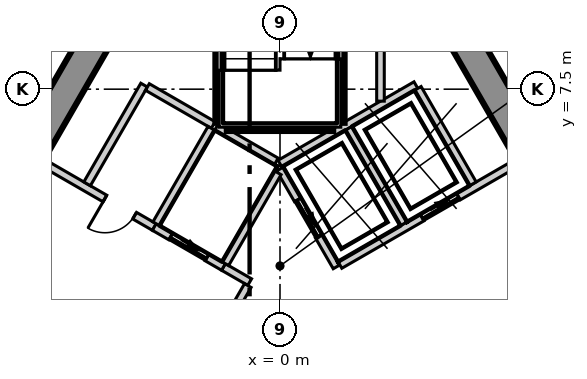
"""IFC4 building model, lengths in metres.
Left out: names, types, materials, properties, quantities, classifications, styles, units other than length and angle.
Written with IfcOpenShell. Run it as: python <this file> out.ifc"""

import sys

from ifc_helpers import new_model, si_unit, direction, frame, frame_2d, origin, place, context, subcontext, project, spatial, polyline, rectangle, outline, extrude, element, fill, save


model = new_model("IFC4")
c1 = context("Model", 3, precision=1e-05, world=origin(), true_north=direction((0.0, 1.0)))
c2 = subcontext(c1, "Body", "Model", "MODEL_VIEW")
j1 = project(units=[si_unit("LENGTHUNIT", "METRE"), si_unit("PLANEANGLEUNIT", "RADIAN")], contexts=[c1])
p1 = place(None, origin())
s1 = spatial("IfcSite", under=j1, at=p1, CompositionType="ELEMENT")
p2 = place(p1, origin())
s2 = spatial("IfcBuilding", under=s1, at=p2, CompositionType="ELEMENT")
p3 = place(p2, frame((0.0, 0.0, 152.3)))
s3 = spatial("IfcBuildingStorey", under=s2, at=p3, CompositionType="ELEMENT", Elevation=152.3)
p4 = place(p3, frame((-1.674, 14.3, -0.3), z_axis=(0.0, 0.0, 1.0), x_axis=(-0.499995765644, -0.866027848477, 0.0)))
e1 = element("IfcWall", 1, at=p4, inside=s3, PredefinedType="SHEAR", context=c2, shape_type="SweptSolid", body=[
    extrude(outline(polyline([(-0.231, -0.4), (1.732, -0.4), (3.695, -0.4), (5.658, -0.4), (7.621, -0.4), (9.584, -0.4), (11.547, -0.4), (13.51, -0.4), (15.473, -0.4), (17.436, -0.4), (19.399, -0.4), (21.362, -0.4), (23.325, -0.4), (22.863, 0.4), (20.977, 0.4), (19.091, 0.4), (17.205, 0.4), (15.319, 0.4), (13.433, 0.4), (11.547, 0.4), (9.661, 0.4), (7.775, 0.4), (5.889, 0.4), (4.003, 0.4), (2.117, 0.4), (0.231, 0.4), (-0.231, -0.4)])), origin(), (0.0, 0.0, 1.0), 4.0),
])
p5 = place(p4, frame((10.997, 0.0, 0.3)))
e2 = element("IfcOpeningElement", 2, at=p5, cuts=e1, PredefinedType="OPENING", context=c2, shape_type="SweptSolid", body=[
    extrude(rectangle(XDim=1.1, YDim=2.1, at=frame_2d((0.55, 1.05))), frame((0.0, 0.41, 0.0), z_axis=(0.0, -1.0, 0.0), x_axis=(1.0, 0.0, 0.0)), (0.0, 0.0, 1.0), 0.82),
])
p6 = place(p4, frame((4.474, 0.0, 0.3)))
e3 = element("IfcOpeningElement", 3, at=p6, cuts=e1, PredefinedType="OPENING", context=c2, shape_type="SweptSolid", body=[
    extrude(rectangle(XDim=0.9, YDim=2.1, at=frame_2d((0.45, 1.05))), frame((0.0, 0.41, 0.0), z_axis=(0.0, -1.0, 0.0), x_axis=(1.0, 0.0, 0.0)), (0.0, 0.0, 1.0), 0.82),
])
p7 = place(p3, frame((13.221, -5.7, -0.3), z_axis=(0.0, 0.0, 1.0), x_axis=(-0.499995765644, 0.866027848477, 0.0)))
e4 = element("IfcWall", 4, at=p7, inside=s3, PredefinedType="SHEAR", context=c2, shape_type="SweptSolid", body=[
    extrude(outline(polyline([(-0.231, -0.4), (1.732, -0.4), (3.695, -0.4), (5.658, -0.4), (7.621, -0.4), (9.584, -0.4), (11.547, -0.4), (13.51, -0.4), (15.473, -0.4), (17.436, -0.4), (19.399, -0.4), (21.362, -0.4), (23.325, -0.4), (22.863, 0.4), (20.977, 0.4), (19.091, 0.4), (17.205, 0.4), (15.319, 0.4), (13.433, 0.4), (11.547, 0.4), (9.661, 0.4), (7.775, 0.4), (5.889, 0.4), (4.003, 0.4), (2.117, 0.4), (0.231, 0.4), (-0.231, -0.4)])), origin(), (0.0, 0.0, 1.0), 4.0),
])
p8 = place(p7, frame((10.647, 0.0, 0.3)))
e5 = element("IfcOpeningElement", 5, at=p8, cuts=e4, PredefinedType="OPENING", context=c2, shape_type="SweptSolid", body=[
    extrude(rectangle(XDim=1.8, YDim=2.1, at=frame_2d((0.9, 1.05))), frame((0.0, 0.41, 0.0), z_axis=(0.0, -1.0, 0.0), x_axis=(1.0, 0.0, 0.0)), (0.0, 0.0, 1.0), 0.82),
])
p9 = place(p3, frame((-3.018, 33.666, 0.0), z_axis=(0.0, 0.0, 1.0), x_axis=(-0.499984613623, -0.866034286931, 0.0)))
e6 = element("IfcWall", 6, at=p9, inside=s3, PredefinedType="ELEMENTEDWALL", context=c2, shape_type="SweptSolid", body=[
    extrude(rectangle(XDim=55.274, YDim=0.2, at=frame_2d((27.637, 0.0))), origin(), (0.0, 0.0, 1.0), 3.7),
])
p10 = place(p9, frame((2.145, 0.0, 0.9)))
e7 = element("IfcOpeningElement", 7, at=p10, cuts=e6, PredefinedType="OPENING", context=c2, shape_type="SweptSolid", body=[
    extrude(rectangle(XDim=4.9, YDim=2.5, at=frame_2d((2.45, 1.25))), frame((0.0, 0.11, 0.0), z_axis=(0.0, -1.0, 0.0), x_axis=(1.0, 0.0, 0.0)), (0.0, 0.0, 1.0), 0.22),
])
p11 = place(p9, frame((8.731, 0.0, 0.9)))
e8 = element("IfcOpeningElement", 8, at=p11, cuts=e6, PredefinedType="OPENING", context=c2, shape_type="SweptSolid", body=[
    extrude(rectangle(XDim=4.9, YDim=2.5, at=frame_2d((2.45, 1.25))), frame((0.0, 0.11, 0.0), z_axis=(0.0, -1.0, 0.0), x_axis=(1.0, 0.0, 0.0)), (0.0, 0.0, 1.0), 0.22),
])
p12 = place(p9, frame((15.318, 0.0, 0.9)))
e9 = element("IfcOpeningElement", 9, at=p12, cuts=e6, PredefinedType="OPENING", context=c2, shape_type="SweptSolid", body=[
    extrude(rectangle(XDim=4.9, YDim=2.5, at=frame_2d((2.45, 1.25))), frame((0.0, 0.11, 0.0), z_axis=(0.0, -1.0, 0.0), x_axis=(1.0, 0.0, 0.0)), (0.0, 0.0, 1.0), 0.22),
])
p13 = place(p9, frame((21.904, 0.0, 0.9)))
e10 = element("IfcOpeningElement", 10, at=p13, cuts=e6, PredefinedType="OPENING", context=c2, shape_type="SweptSolid", body=[
    extrude(rectangle(XDim=4.9, YDim=2.5, at=frame_2d((2.45, 1.25))), frame((0.0, 0.11, 0.0), z_axis=(0.0, -1.0, 0.0), x_axis=(1.0, 0.0, 0.0)), (0.0, 0.0, 1.0), 0.22),
])
p14 = place(p9, frame((28.49, 0.0, 0.9)))
e11 = element("IfcOpeningElement", 11, at=p14, cuts=e6, PredefinedType="OPENING", context=c2, shape_type="SweptSolid", body=[
    extrude(rectangle(XDim=4.9, YDim=2.5, at=frame_2d((2.45, 1.25))), frame((0.0, 0.11, 0.0), z_axis=(0.0, -1.0, 0.0), x_axis=(1.0, 0.0, 0.0)), (0.0, 0.0, 1.0), 0.22),
])
p15 = place(p9, frame((35.076, 0.0, 0.9)))
e12 = element("IfcOpeningElement", 12, at=p15, cuts=e6, PredefinedType="OPENING", context=c2, shape_type="SweptSolid", body=[
    extrude(rectangle(XDim=4.9, YDim=2.5, at=frame_2d((2.45, 1.25))), frame((0.0, 0.11, 0.0), z_axis=(0.0, -1.0, 0.0), x_axis=(1.0, 0.0, 0.0)), (0.0, 0.0, 1.0), 0.22),
])
p16 = place(p9, frame((41.662, 0.0, 0.9)))
e13 = element("IfcOpeningElement", 13, at=p16, cuts=e6, PredefinedType="OPENING", context=c2, shape_type="SweptSolid", body=[
    extrude(rectangle(XDim=4.9, YDim=2.5, at=frame_2d((2.45, 1.25))), frame((0.0, 0.11, 0.0), z_axis=(0.0, -1.0, 0.0), x_axis=(1.0, 0.0, 0.0)), (0.0, 0.0, 1.0), 0.22),
])
p17 = place(p9, frame((48.248, 0.0, 0.9)))
e14 = element("IfcOpeningElement", 14, at=p17, cuts=e6, PredefinedType="OPENING", context=c2, shape_type="SweptSolid", body=[
    extrude(rectangle(XDim=4.9, YDim=2.5, at=frame_2d((2.45, 1.25))), frame((0.0, 0.11, 0.0), z_axis=(0.0, -1.0, 0.0), x_axis=(1.0, 0.0, 0.0)), (0.0, 0.0, 1.0), 0.22),
])
p18 = place(p3, frame((30.664, -14.22, 0.0), z_axis=(0.0, 0.0, 1.0), x_axis=(-0.499984613623, 0.866034286931, 0.0)))
e15 = element("IfcWall", 15, at=p18, inside=s3, PredefinedType="ELEMENTEDWALL", context=c2, shape_type="SweptSolid", body=[
    extrude(rectangle(XDim=55.274, YDim=0.2, at=frame_2d((27.637, 0.0))), origin(), (0.0, 0.0, 1.0), 3.7),
])
p19 = place(p18, frame((2.146, 0.0, 0.9)))
e16 = element("IfcOpeningElement", 16, at=p19, cuts=e15, PredefinedType="OPENING", context=c2, shape_type="SweptSolid", body=[
    extrude(rectangle(XDim=4.9, YDim=2.5, at=frame_2d((2.45, 1.25))), frame((0.0, 0.11, 0.0), z_axis=(0.0, -1.0, 0.0), x_axis=(1.0, 0.0, 0.0)), (0.0, 0.0, 1.0), 0.22),
])
p20 = place(p18, frame((8.732, 0.0, 0.9)))
e17 = element("IfcOpeningElement", 17, at=p20, cuts=e15, PredefinedType="OPENING", context=c2, shape_type="SweptSolid", body=[
    extrude(rectangle(XDim=4.9, YDim=2.5, at=frame_2d((2.45, 1.25))), frame((0.0, 0.11, 0.0), z_axis=(0.0, -1.0, 0.0), x_axis=(1.0, 0.0, 0.0)), (0.0, 0.0, 1.0), 0.22),
])
p21 = place(p18, frame((15.318, 0.0, 0.9)))
e18 = element("IfcOpeningElement", 18, at=p21, cuts=e15, PredefinedType="OPENING", context=c2, shape_type="SweptSolid", body=[
    extrude(rectangle(XDim=4.9, YDim=2.5, at=frame_2d((2.45, 1.25))), frame((0.0, 0.11, 0.0), z_axis=(0.0, -1.0, 0.0), x_axis=(1.0, 0.0, 0.0)), (0.0, 0.0, 1.0), 0.22),
])
p22 = place(p18, frame((21.904, 0.0, 0.9)))
e19 = element("IfcOpeningElement", 19, at=p22, cuts=e15, PredefinedType="OPENING", context=c2, shape_type="SweptSolid", body=[
    extrude(rectangle(XDim=4.9, YDim=2.5, at=frame_2d((2.45, 1.25))), frame((0.0, 0.11, 0.0), z_axis=(0.0, -1.0, 0.0), x_axis=(1.0, 0.0, 0.0)), (0.0, 0.0, 1.0), 0.22),
])
p23 = place(p18, frame((28.49, 0.0, 0.9)))
e20 = element("IfcOpeningElement", 20, at=p23, cuts=e15, PredefinedType="OPENING", context=c2, shape_type="SweptSolid", body=[
    extrude(rectangle(XDim=4.9, YDim=2.5, at=frame_2d((2.45, 1.25))), frame((0.0, 0.11, 0.0), z_axis=(0.0, -1.0, 0.0), x_axis=(1.0, 0.0, 0.0)), (0.0, 0.0, 1.0), 0.22),
])
p24 = place(p18, frame((35.076, 0.0, 0.9)))
e21 = element("IfcOpeningElement", 21, at=p24, cuts=e15, PredefinedType="OPENING", context=c2, shape_type="SweptSolid", body=[
    extrude(rectangle(XDim=4.9, YDim=2.5, at=frame_2d((2.45, 1.25))), frame((0.0, 0.11, 0.0), z_axis=(0.0, -1.0, 0.0), x_axis=(1.0, 0.0, 0.0)), (0.0, 0.0, 1.0), 0.22),
])
p25 = place(p18, frame((41.662, 0.0, 0.9)))
e22 = element("IfcOpeningElement", 22, at=p25, cuts=e15, PredefinedType="OPENING", context=c2, shape_type="SweptSolid", body=[
    extrude(rectangle(XDim=4.9, YDim=2.5, at=frame_2d((2.45, 1.25))), frame((0.0, 0.11, 0.0), z_axis=(0.0, -1.0, 0.0), x_axis=(1.0, 0.0, 0.0)), (0.0, 0.0, 1.0), 0.22),
])
p26 = place(p18, frame((48.248, 0.0, 0.9)))
e23 = element("IfcOpeningElement", 23, at=p26, cuts=e15, PredefinedType="OPENING", context=c2, shape_type="SweptSolid", body=[
    extrude(rectangle(XDim=4.9, YDim=2.5, at=frame_2d((2.45, 1.25))), frame((0.0, 0.11, 0.0), z_axis=(0.0, -1.0, 0.0), x_axis=(1.0, 0.0, 0.0)), (0.0, 0.0, 1.0), 0.22),
])
p27 = place(p3, frame((-8.902, 6.181, 0.0), z_axis=(0.0, 0.0, 1.0), x_axis=(0.499992688384, 0.866029625107, 0.0)))
e24 = element("IfcWall", 24, at=p27, inside=s3, PredefinedType="PARTITIONING", context=c2, shape_type="SweptSolid", body=[
    extrude(rectangle(XDim=17.804, YDim=0.15, at=frame_2d((8.902, 0.0))), origin(), (0.0, 0.0, 1.0), 3.7),
])
p28 = place(p27, frame((14.554, 0.0, 0.0)))
e25 = element("IfcOpeningElement", 25, at=p28, cuts=e24, PredefinedType="OPENING", context=c2, shape_type="SweptSolid", body=[
    extrude(rectangle(XDim=1.0, YDim=2.1, at=frame_2d((0.5, 1.05))), frame((0.0, 0.085, 0.0), z_axis=(0.0, -1.0, 0.0), x_axis=(1.0, 0.0, 0.0)), (0.0, 0.0, 1.0), 0.17),
])
p29 = place(p27, frame((5.62, 0.0, 0.0)))
e26 = element("IfcOpeningElement", 26, at=p29, cuts=e24, PredefinedType="OPENING", context=c2, shape_type="SweptSolid", body=[
    extrude(rectangle(XDim=1.1, YDim=2.1, at=frame_2d((0.55, 1.05))), frame((0.0, 0.085, 0.0), z_axis=(0.0, -1.0, 0.0), x_axis=(1.0, 0.0, 0.0)), (0.0, 0.0, 1.0), 0.17),
])
p30 = place(p3, frame((0.076, 21.468, 0.0), z_axis=(0.0, 0.0, 1.0), x_axis=(0.500006592492, -0.866021597574, 0.0)))
e27 = element("IfcWall", 27, at=p30, inside=s3, PredefinedType="PARTITIONING", context=c2, shape_type="SweptSolid", body=[
    extrude(rectangle(XDim=17.652, YDim=0.15, at=frame_2d((8.826, 0.0))), origin(), (0.0, 0.0, 1.0), 3.7),
])
p31 = place(p30, frame((8.204, 0.0, 0.0)))
e28 = element("IfcOpeningElement", 28, at=p31, cuts=e27, PredefinedType="OPENING", context=c2, shape_type="SweptSolid", body=[
    extrude(rectangle(XDim=1.1, YDim=2.1, at=frame_2d((0.55, 1.05))), frame((0.0, 0.085, 0.0), z_axis=(0.0, -1.0, 0.0), x_axis=(1.0, 0.0, 0.0)), (0.0, 0.0, 1.0), 0.17),
])
p32 = place(p3, frame((-11.983, 8.045, 0.0), z_axis=(0.0, 0.0, 1.0), x_axis=(0.49998396455, 0.866034661658, 0.0)))
e29 = element("IfcWall", 29, at=p32, inside=s3, PredefinedType="PARTITIONING", context=c2, shape_type="SweptSolid", body=[
    extrude(rectangle(XDim=12.122, YDim=0.15, at=frame_2d((6.061, 0.0))), origin(), (0.0, 0.0, 1.0), 3.7),
])
p33 = place(p32, frame((5.547, 0.0, 0.0)))
e30 = element("IfcOpeningElement", 30, at=p33, cuts=e29, PredefinedType="OPENING", context=c2, shape_type="SweptSolid", body=[
    extrude(rectangle(XDim=1.0, YDim=2.1, at=frame_2d((0.5, 1.05))), frame((0.0, 0.085, 0.0), z_axis=(0.0, -1.0, 0.0), x_axis=(1.0, 0.0, 0.0)), (0.0, 0.0, 1.0), 0.17),
])
p34 = place(p3, frame((-0.002, 5.541, 0.0), z_axis=(0.0, 0.0, 1.0), x_axis=(0.86600155993, 0.500041296494, 0.0)))
e31 = element("IfcWall", 31, at=p34, inside=s3, PredefinedType="SOLIDWALL", context=c2, shape_type="SweptSolid", body=[
    extrude(rectangle(XDim=4.132, YDim=0.2, at=frame_2d((2.066, 0.0))), origin(), (0.0, 0.0, 1.0), 3.7),
])
p35 = place(p3, frame((0.0, 5.4, 0.0), z_axis=(0.0, 0.0, 1.0), x_axis=(0.500103862429, -0.865965430478, 0.0)))
e32 = element("IfcWall", 32, at=p35, inside=s3, PredefinedType="SOLIDWALL", context=c2, shape_type="SweptSolid", body=[
    extrude(rectangle(XDim=2.973, YDim=0.2, at=frame_2d((1.487, 0.0))), origin(), (0.0, 0.0, 1.0), 3.7),
])
p36 = place(p35, frame((0.937, 0.0, 0.0)))
e33 = element("IfcOpeningElement", 33, at=p36, cuts=e32, PredefinedType="OPENING", context=c2, shape_type="SweptSolid", body=[
    extrude(rectangle(XDim=1.1, YDim=2.1, at=frame_2d((0.55, 1.05))), frame((0.0, 0.11, 0.0), z_axis=(0.0, -1.0, 0.0), x_axis=(1.0, 0.0, 0.0)), (0.0, 0.0, 1.0), 0.22),
])
p37 = place(p3, frame((1.577, 2.874, 0.0), z_axis=(0.0, 0.0, 1.0), x_axis=(0.866073694534, 0.499916348638, 0.0)))
e34 = element("IfcWall", 34, at=p37, inside=s3, PredefinedType="SOLIDWALL", context=c2, shape_type="SweptSolid", body=[
    extrude(rectangle(XDim=5.777, YDim=0.2, at=frame_2d((2.888, 0.0))), origin(), (0.0, 0.0, 1.0), 3.7),
])
p38 = place(p37, frame((2.497, 0.0, 0.0)))
e35 = element("IfcOpeningElement", 35, at=p38, cuts=e34, PredefinedType="OPENING", context=c2, shape_type="SweptSolid", body=[
    extrude(rectangle(XDim=1.1, YDim=2.1, at=frame_2d((0.55, 1.05))), frame((0.0, 0.11, 0.0), z_axis=(0.0, -1.0, 0.0), x_axis=(1.0, 0.0, 0.0)), (0.0, 0.0, 1.0), 0.22),
])
for number, where, z_axis, x_axis in (
    (36, (1.807, 6.47, 0.0), (0.0, 0.0, 1.0), (0.5, -0.866, 0.0)),
    (37, (3.626, 7.52, 0.0), (0.0, 0.0, 1.0), (0.5, -0.866, 0.0)),
):
    element("IfcWall", number, at=place(p3, frame(where, z_axis=z_axis, x_axis=x_axis)), inside=s3, PredefinedType="SOLIDWALL", context=c2, shape_type="SweptSolid", body=[
        extrude(rectangle(XDim=2.9, YDim=0.2, at=frame_2d((1.45, 0.0))), origin(), (0.0, 0.0, 1.0), 3.7),
    ])
p39 = place(p3, frame((3.278, -0.071, 0.0), z_axis=(0.0, 0.0, 1.0), x_axis=(0.865929348003, 0.5001663366, 0.0)))
e38 = element("IfcWall", 38, at=p39, inside=s3, PredefinedType="SOLIDWALL", context=c2, shape_type="SweptSolid", body=[
    extrude(rectangle(XDim=5.776, YDim=0.2, at=frame_2d((2.888, 0.0))), origin(), (0.0, 0.0, 1.0), 3.7),
])
p40 = place(p3, frame((-8.28, 2.818, 0.0), z_axis=(0.0, 0.0, 1.0), x_axis=(0.86600175068, -0.50004096614, 0.0)))
e39 = element("IfcWall", 39, at=p40, inside=s3, PredefinedType="SOLIDWALL", context=c2, shape_type="SweptSolid", body=[
    extrude(rectangle(XDim=3.782, YDim=0.2, at=frame_2d((1.891, 0.0))), origin(), (0.0, 0.0, 1.0), 3.7),
])
p41 = place(p40, frame((2.18, 0.0, 0.0)))
e40 = element("IfcOpeningElement", 40, at=p41, cuts=e39, PredefinedType="OPENING", context=c2, shape_type="SweptSolid", body=[
    extrude(rectangle(XDim=1.1, YDim=2.1, at=frame_2d((0.55, 1.05))), frame((0.0, 0.11, 0.0), z_axis=(0.0, -1.0, 0.0), x_axis=(1.0, 0.0, 0.0)), (0.0, 0.0, 1.0), 0.22),
])
p42 = place(p3, frame((-6.58, 5.762, 0.0), z_axis=(0.0, 0.0, 1.0), x_axis=(0.866029704776, -0.49999255039, 0.0)))
e41 = element("IfcWall", 41, at=p42, inside=s3, PredefinedType="SOLIDWALL", context=c2, shape_type="SweptSolid", body=[
    extrude(rectangle(XDim=3.782, YDim=0.2, at=frame_2d((1.891, 0.0))), origin(), (0.0, 0.0, 1.0), 3.7),
])
p43 = place(p42, frame((2.279, 0.0, 0.0)))
e42 = element("IfcOpeningElement", 42, at=p43, cuts=e41, PredefinedType="OPENING", context=c2, shape_type="SweptSolid", body=[
    extrude(rectangle(XDim=0.9, YDim=2.1, at=frame_2d((0.45, 1.05))), frame((0.0, 0.11, 0.0), z_axis=(0.0, -1.0, 0.0), x_axis=(1.0, 0.0, 0.0)), (0.0, 0.0, 1.0), 0.22),
])
p44 = place(p3, frame((-1.488, 2.822, 0.0), z_axis=(0.0, 0.0, 1.0), x_axis=(0.866236612152, -0.499633997809, 0.0)))
e43 = element("IfcWall", 43, at=p44, inside=s3, PredefinedType="SOLIDWALL", context=c2, shape_type="SweptSolid", body=[
    extrude(rectangle(XDim=0.796, YDim=0.2, at=frame_2d((0.398, 0.0))), origin(), (0.0, 0.0, 1.0), 3.7),
])
p45 = place(p3, frame((-5.076, 5.009, 0.0), z_axis=(0.0, 0.0, 1.0), x_axis=(0.50002537861, 0.866010750942, 0.0)))
e44 = element("IfcWall", 44, at=p45, inside=s3, PredefinedType="SOLIDWALL", context=c2, shape_type="SweptSolid", body=[
    extrude(rectangle(XDim=3.0, YDim=0.2, at=frame_2d((1.5, 0.0))), origin(), (0.0, 0.0, 1.0), 3.7),
])
p46 = place(p3, frame((-3.489, 7.557, 0.0), z_axis=(0.0, 0.0, 1.0), x_axis=(0.866010750942, -0.50002537861, 0.0)))
e45 = element("IfcWall", 45, at=p46, inside=s3, PredefinedType="SOLIDWALL", context=c2, shape_type="SweptSolid", body=[
    extrude(rectangle(XDim=2.0, YDim=0.2, at=frame_2d((1.0, 0.0))), origin(), (0.0, 0.0, 1.0), 3.7),
])
p47 = place(p3, frame((-2.444, -0.433, 0.0), z_axis=(0.0, 0.0, 1.0), x_axis=(0.500035624827, 0.866004834804, 0.0)))
e46 = element("IfcWall", 46, at=p47, inside=s3, PredefinedType="SOLIDWALL", context=c2, shape_type="SweptSolid", body=[
    extrude(rectangle(XDim=3.194, YDim=0.2, at=frame_2d((1.597, 0.0))), origin(), (0.0, 0.0, 1.0), 3.7),
])
p48 = place(p3, frame((-3.309, 3.873, 0.0), z_axis=(0.0, 0.0, 1.0), x_axis=(0.866098583652, -0.499873227325, 0.0)))
e47 = element("IfcWall", 47, at=p48, inside=s3, PredefinedType="SOLIDWALL", context=c2, shape_type="SweptSolid", body=[
    extrude(rectangle(XDim=2.103, YDim=0.2, at=frame_2d((1.051, 0.0))), origin(), (0.0, 0.0, 1.0), 3.7),
])
p49 = place(p48, frame((0.502, 0.0, 0.0)))
e48 = element("IfcOpeningElement", 48, at=p49, cuts=e47, PredefinedType="OPENING", context=c2, shape_type="SweptSolid", body=[
    extrude(rectangle(XDim=1.1, YDim=2.1, at=frame_2d((0.55, 1.05))), frame((0.0, 0.11, 0.0), z_axis=(0.0, -1.0, 0.0), x_axis=(1.0, 0.0, 0.0)), (0.0, 0.0, 1.0), 0.22),
])
p50 = place(p3, frame((-3.257, 3.959, 0.0), z_axis=(0.0, 0.0, 1.0), x_axis=(0.50012328804, 0.865954211699, 0.0)))
e49 = element("IfcWall", 49, at=p50, inside=s3, PredefinedType="SOLIDWALL", context=c2, shape_type="SweptSolid", body=[
    extrude(rectangle(XDim=2.9, YDim=0.2, at=frame_2d((1.45, 0.0))), origin(), (0.0, 0.0, 1.0), 3.7),
])
p51 = place(p3, frame((-1.67, 6.507, 0.0), z_axis=(0.0, 0.0, 1.0), x_axis=(0.865941441609, -0.500145398563, 0.0)))
e50 = element("IfcWall", 50, at=p51, inside=s3, PredefinedType="SOLIDWALL", context=c2, shape_type="SweptSolid", body=[
    extrude(rectangle(XDim=1.815, YDim=0.2, at=frame_2d((0.908, 0.0))), origin(), (0.0, 0.0, 1.0), 3.7),
])
p52 = place(p3, frame((-1.438, 2.909, 0.0), z_axis=(0.0, 0.0, 1.0), x_axis=(0.499829630636, 0.866123744241, 0.0)))
e51 = element("IfcWall", 51, at=p52, inside=s3, PredefinedType="SOLIDWALL", context=c2, shape_type="SweptSolid", body=[
    extrude(rectangle(XDim=2.761, YDim=0.2, at=frame_2d((1.38, 0.0))), origin(), (0.0, 0.0, 1.0), 3.7),
])
p53 = place(p3, frame((2.644, 7.185, 0.0), z_axis=(0.0, 0.0, 1.0), x_axis=(0.0, 1.0, 0.0)))
e52 = element("IfcWall", 52, at=p53, inside=s3, PredefinedType="SOLIDWALL", context=c2, shape_type="SweptSolid", body=[
    extrude(rectangle(XDim=5.395, YDim=0.2, at=frame_2d((2.698, 0.0))), origin(), (0.0, 0.0, 1.0), 3.7),
])
p54 = place(p3, frame((1.6, 6.615, 0.0), z_axis=(0.0, 0.0, 1.0), x_axis=(0.0, 1.0, 0.0)))
e53 = element("IfcWall", 53, at=p54, inside=s3, PredefinedType="SOLIDWALL", context=c2, shape_type="SweptSolid", body=[
    extrude(rectangle(XDim=7.665, YDim=0.2, at=frame_2d((3.833, 0.0))), origin(), (0.0, 0.0, 1.0), 3.7),
])
p55 = place(p3, frame((-1.4, 6.5, 0.0), z_axis=(0.0, 0.0, 1.0), x_axis=(1.0, 0.0, 0.0)))
e54 = element("IfcWall", 54, at=p55, inside=s3, PredefinedType="SOLIDWALL", context=c2, shape_type="SweptSolid", body=[
    extrude(rectangle(XDim=2.8, YDim=0.2, at=frame_2d((1.4, 0.0))), origin(), (0.0, 0.0, 1.0), 3.7),
])
p56 = place(p3, frame((-1.6, 6.615, 0.0), z_axis=(0.0, 0.0, 1.0), x_axis=(0.0, 1.0, 0.0)))
e55 = element("IfcWall", 55, at=p56, inside=s3, PredefinedType="SOLIDWALL", context=c2, shape_type="SweptSolid", body=[
    extrude(rectangle(XDim=7.665, YDim=0.2, at=frame_2d((3.833, 0.0))), origin(), (0.0, 0.0, 1.0), 3.7),
])
p57 = place(p36, origin())
e56 = element("IfcDoor", 56, at=p57, inside=s3, OperationType="SLIDING_TO_LEFT", PredefinedType="DOOR", context=c2, shape_type="SweptSolid", body=[
    extrude(rectangle(XDim=1.1, YDim=2.1, at=frame_2d((0.55, 1.05))), frame((0.0, 0.025, 0.0), z_axis=(0.0, -1.0, 0.0), x_axis=(1.0, 0.0, 0.0)), (0.0, 0.0, 1.0), 0.05),
])
fill(e33, e56)
p58 = place(p38, origin())
e57 = element("IfcDoor", 57, at=p58, inside=s3, OperationType="SLIDING_TO_LEFT", PredefinedType="DOOR", context=c2, shape_type="SweptSolid", body=[
    extrude(rectangle(XDim=1.1, YDim=2.1, at=frame_2d((0.55, 1.05))), frame((0.0, 0.025, 0.0), z_axis=(0.0, -1.0, 0.0), x_axis=(1.0, 0.0, 0.0)), (0.0, 0.0, 1.0), 0.05),
])
fill(e35, e57)
p59 = place(p49, origin())
e58 = element("IfcDoor", 58, at=p59, inside=s3, OperationType="SLIDING_TO_LEFT", PredefinedType="DOOR", context=c2, shape_type="SweptSolid", body=[
    extrude(rectangle(XDim=1.1, YDim=2.1, at=frame_2d((0.55, 1.05))), frame((0.0, 0.025, 0.0), z_axis=(0.0, -1.0, 0.0), x_axis=(1.0, 0.0, 0.0)), (0.0, 0.0, 1.0), 0.05),
])
fill(e48, e58)
p60 = place(p43, origin())
e59 = element("IfcDoor", 59, at=p60, inside=s3, OperationType="SINGLE_SWING_LEFT", PredefinedType="DOOR", context=c2, shape_type="SweptSolid", body=[
    extrude(rectangle(XDim=0.9, YDim=2.1, at=frame_2d((0.45, 1.05))), frame((0.0, 0.025, 0.0), z_axis=(0.0, -1.0, 0.0), x_axis=(1.0, 0.0, 0.0)), (0.0, 0.0, 1.0), 0.05),
])
fill(e42, e59)
save(model, sys.argv[1])
